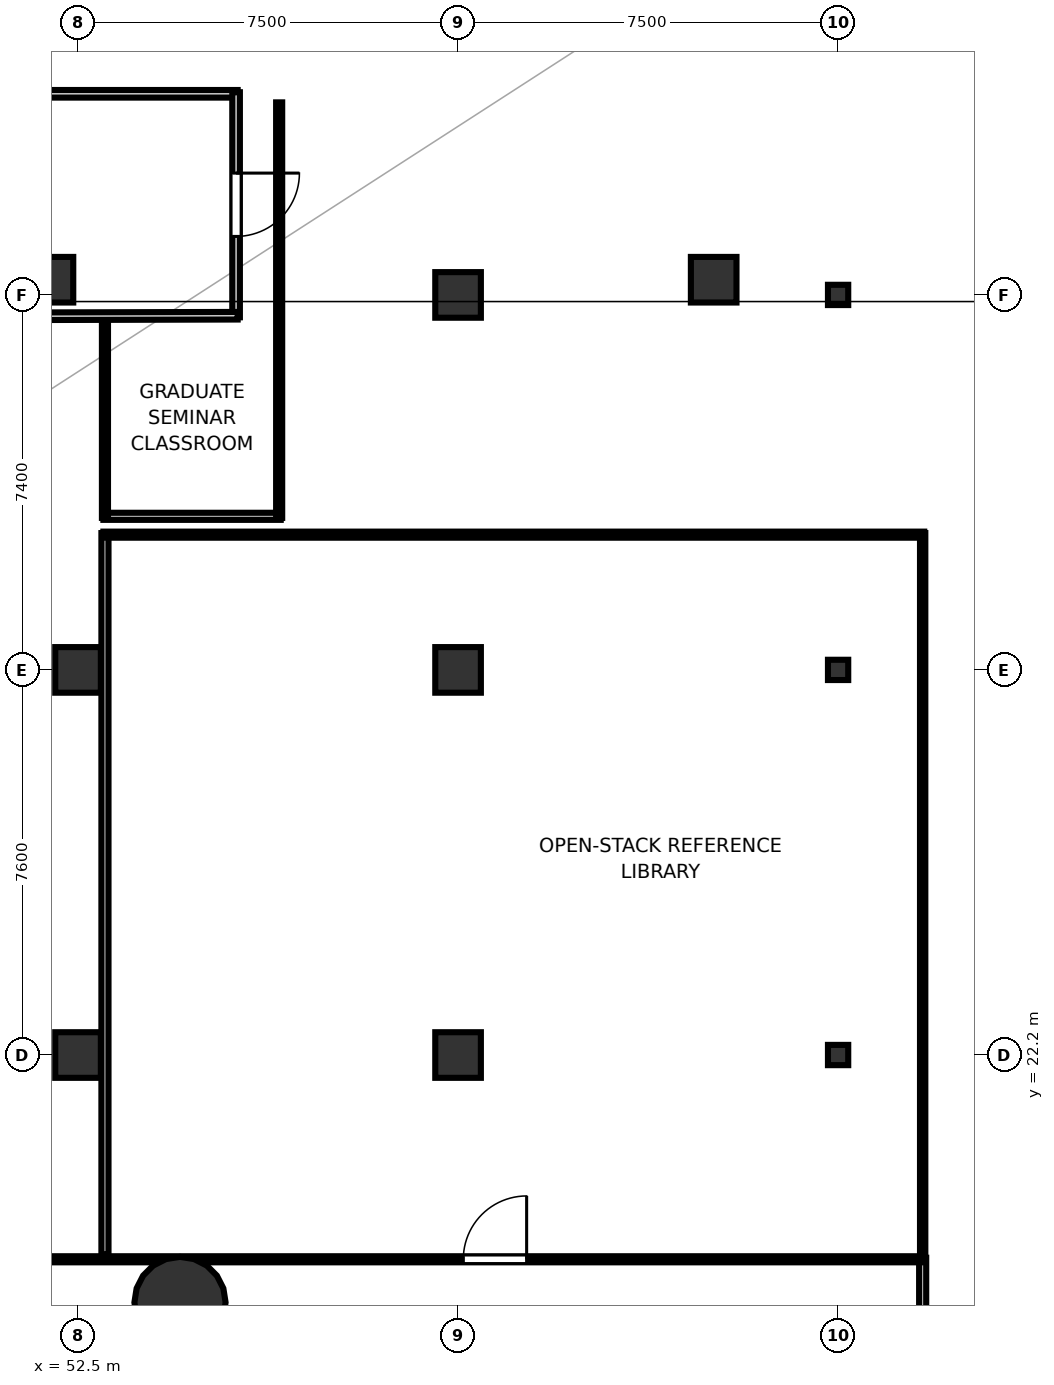
"""IFC4 building model, lengths in metres.
Left out: names, types, materials, properties, quantities, classifications, styles, units other than length and angle.
Written with IfcOpenShell. Run it as: python <this file> out.ifc"""

import sys

from ifc_helpers import new_model, si_unit, direction, frame, frame_2d, origin, origin_2d, place, context, subcontext, project, spatial, rectangle, hollow_circle, i_section, extrude, element, fill, save


model = new_model("IFC4")
c1 = context("Model", 3, precision=1e-05, world=origin(), true_north=direction((0.0, 1.0)))
c2 = subcontext(c1, "Body", "Model", "MODEL_VIEW")
j1 = project(units=[si_unit("LENGTHUNIT", "METRE"), si_unit("PLANEANGLEUNIT", "RADIAN")], contexts=[c1])
p1 = place(None, origin())
s1 = spatial("IfcSite", under=j1, at=p1, CompositionType="ELEMENT")
p2 = place(p1, origin())
s2 = spatial("IfcBuilding", under=s1, at=p2, CompositionType="ELEMENT")
p3 = place(p2, frame((0.0, 0.0, 15.8)))
s3 = spatial("IfcBuildingStorey", under=s2, at=p3, CompositionType="ELEMENT", Elevation=15.8)
p4 = place(p3, frame((54.512, 17.317, 0.0), z_axis=(0.0, 0.0, 1.0), x_axis=(1.0, 0.0, 0.0)))
e1 = element("IfcColumn", 1, at=p4, inside=s3, PredefinedType="COLUMN", context=c2, shape_type="SweptSolid", body=[
    extrude(hollow_circle(Radius=0.9, WallThickness=0.045, at=origin_2d()), origin(), (0.0, 0.0, 1.0), 4.8),
])
for number, where, z_axis, x_axis in (
    (2, (51.955, 37.5, 0.0), (0.0, 0.0, 1.0), (1.0, 0.0, 0.0)),
    (3, (65.045, 37.5, 0.0), (0.0, 0.0, 1.0), (1.0, 0.0, 0.0)),
    (4, (52.5, 22.2, 0.0), (0.0, 0.0, 1.0), (1.0, 0.0, 0.0)),
    (5, (52.5, 29.8, 0.0), (0.0, 0.0, 1.0), (1.0, 0.0, 0.0)),
    (6, (60.0, 22.2, 0.0), (0.0, 0.0, 1.0), (1.0, 0.0, 0.0)),
    (7, (60.0, 29.8, 0.0), (0.0, 0.0, 1.0), (1.0, 0.0, 0.0)),
    (8, (60.0, 37.2, 0.0), (0.0, 0.0, 1.0), (1.0, 0.0, 0.0)),
):
    element("IfcColumn", number, at=place(p3, frame(where, z_axis=z_axis, x_axis=x_axis)), inside=s3, PredefinedType="COLUMN", context=c2, shape_type="SweptSolid", body=[
        extrude(rectangle(XDim=0.9, YDim=0.9, at=origin_2d()), origin(), (0.0, 0.0, 1.0), 4.8),
    ])
for number, where, z_axis, x_axis in (
    (9, (67.5, 22.2, 0.0), (0.0, 0.0, 1.0), (1.0, 0.0, 0.0)),
    (10, (67.5, 29.8, 0.0), (0.0, 0.0, 1.0), (1.0, 0.0, 0.0)),
    (11, (67.5, 37.2, 0.0), (0.0, 0.0, 1.0), (1.0, 0.0, 0.0)),
):
    element("IfcColumn", number, at=place(p3, frame(where, z_axis=z_axis, x_axis=x_axis)), inside=s3, PredefinedType="COLUMN", context=c2, shape_type="SweptSolid", body=[
        extrude(i_section(OverallWidth=0.4, OverallDepth=0.4, WebThickness=0.013, FlangeThickness=0.021, at=origin_2d()), origin(), (0.0, 0.0, 1.0), 4.8),
    ])
p5 = place(p3, frame((46.5, 41.169, 0.0), z_axis=(0.0, 0.0, 1.0), x_axis=(1.0, 0.0, 0.0)))
e12 = element("IfcWall", 12, at=p5, inside=s3, PredefinedType="PARTITIONING", context=c2, shape_type="SweptSolid", body=[
    extrude(rectangle(XDim=9.15, YDim=0.15, at=frame_2d((4.575, 0.0))), origin(), (0.0, 0.0, 1.0), 3.02),
])
p6 = place(p3, frame((55.619, 41.2, 0.0), z_axis=(0.0, 0.0, 1.0), x_axis=(0.0, -1.0, 0.0)))
e13 = element("IfcWall", 13, at=p6, inside=s3, PredefinedType="PARTITIONING", context=c2, shape_type="SweptSolid", body=[
    extrude(rectangle(XDim=4.442, YDim=0.15, at=frame_2d((2.221, 0.0))), origin(), (0.0, 0.0, 1.0), 3.02),
])
p7 = place(p6, frame((1.596, 0.0, 0.0)))
e14 = element("IfcOpeningElement", 14, at=p7, cuts=e13, PredefinedType="OPENING", context=c2, shape_type="SweptSolid", body=[
    extrude(rectangle(XDim=1.25, YDim=2.2, at=frame_2d((0.625, 1.1))), frame((0.0, 0.085, 0.0), z_axis=(0.0, -1.0, 0.0), x_axis=(1.0, 0.0, 0.0)), (0.0, 0.0, 1.0), 0.17),
])
p8 = place(p3, frame((55.65, 36.789, 0.0), z_axis=(0.0, 0.0, 1.0), x_axis=(-0.999996901459, -0.002489391821, 0.0)))
e15 = element("IfcWall", 15, at=p8, inside=s3, PredefinedType="PARTITIONING", context=c2, shape_type="SweptSolid", body=[
    extrude(rectangle(XDim=8.925, YDim=0.15, at=frame_2d((4.462, 0.0))), origin(), (0.0, 0.0, 1.0), 3.02),
])
p9 = place(p3, frame((69.169, 18.2, 0.0), z_axis=(0.0, 0.0, 1.0), x_axis=(0.0, -1.0, 0.0)))
e16 = element("IfcWall", 16, at=p9, inside=s3, PredefinedType="PARTITIONING", context=c2, shape_type="SweptSolid", body=[
    extrude(rectangle(XDim=10.796, YDim=0.14, at=frame_2d((5.398, 0.0))), origin(), (0.0, 0.0, 1.0), 3.02),
])
p10 = place(p3, frame((42.3, 18.169, 0.0), z_axis=(0.0, 0.0, 1.0), x_axis=(1.0, 0.0, 0.0)))
e17 = element("IfcWall", 17, at=p10, inside=s3, PredefinedType="PARTITIONING", context=c2, shape_type="SweptSolid", body=[
    extrude(rectangle(XDim=26.9, YDim=0.12, at=frame_2d((13.45, 0.0))), origin(), (0.0, 0.0, 1.0), 3.02),
])
p11 = place(p10, frame((17.803, 0.0, 0.0)))
e18 = element("IfcOpeningElement", 18, at=p11, cuts=e17, PredefinedType="OPENING", context=c2, shape_type="SweptSolid", body=[
    extrude(rectangle(XDim=1.25, YDim=2.2, at=frame_2d((0.625, 1.1))), frame((0.0, 0.07, 0.0), z_axis=(0.0, -1.0, 0.0), x_axis=(1.0, 0.0, 0.0)), (0.0, 0.0, 1.0), 0.14),
])
p12 = place(p3, frame((53.031, 18.262, 0.0), z_axis=(0.0, 0.0, 1.0), x_axis=(0.0, 1.0, 0.0)))
e19 = element("IfcWall", 19, at=p12, inside=s3, PredefinedType="PARTITIONING", context=c2, shape_type="SweptSolid", body=[
    extrude(rectangle(XDim=14.238, YDim=0.14, at=frame_2d((7.119, 0.0))), origin(), (0.0, 0.0, 1.0), 3.02),
])
p13 = place(p3, frame((53.0, 32.469, 0.0), z_axis=(0.0, 0.0, 1.0), x_axis=(1.0, 0.0, 0.0)))
e20 = element("IfcWall", 20, at=p13, inside=s3, PredefinedType="PARTITIONING", context=c2, shape_type="SweptSolid", body=[
    extrude(rectangle(XDim=16.2, YDim=0.12, at=frame_2d((8.1, 0.0))), origin(), (0.0, 0.0, 1.0), 3.02),
])
p14 = place(p3, frame((69.169, 32.5, 0.0), z_axis=(0.0, 0.0, 1.0), x_axis=(0.0, -1.0, 0.0)))
e21 = element("IfcWall", 21, at=p14, inside=s3, PredefinedType="PARTITIONING", context=c2, shape_type="SweptSolid", body=[
    extrude(rectangle(XDim=14.238, YDim=0.105, at=frame_2d((7.119, 0.0))), origin(), (0.0, 0.0, 1.0), 3.02),
])
p15 = place(p3, frame((56.5, 32.831, 0.0), z_axis=(0.0, 0.0, 1.0), x_axis=(-1.0, 0.0, 0.0)))
e22 = element("IfcWall", 22, at=p15, inside=s3, PredefinedType="PARTITIONING", context=c2, shape_type="SweptSolid", body=[
    extrude(rectangle(XDim=3.5, YDim=0.14, at=frame_2d((1.75, 0.0))), origin(), (0.0, 0.0, 1.0), 3.02),
])
p16 = place(p3, frame((53.031, 32.8, 0.0), z_axis=(0.0, 0.0, 1.0), x_axis=(0.0, 1.0, 0.0)))
e23 = element("IfcWall", 23, at=p16, inside=s3, PredefinedType="PARTITIONING", context=c2, shape_type="SweptSolid", body=[
    extrude(rectangle(XDim=3.89, YDim=0.12, at=frame_2d((1.945, 0.0))), origin(), (0.0, 0.0, 1.0), 3.02),
])
p17 = place(p3, frame((56.469, 41.0, 0.0), z_axis=(0.0, 0.0, 1.0), x_axis=(0.0, -1.0, 0.0)))
e24 = element("IfcWall", 24, at=p17, inside=s3, PredefinedType="PARTITIONING", context=c2, shape_type="SweptSolid", body=[
    extrude(rectangle(XDim=8.2, YDim=0.12, at=frame_2d((4.1, 0.0))), origin(), (0.0, 0.0, 1.0), 3.02),
])
p18 = place(p7, origin())
e25 = element("IfcDoor", 25, at=p18, inside=s3, OperationType="SINGLE_SWING_LEFT", PredefinedType="DOOR", context=c2, shape_type="SweptSolid", body=[
    extrude(rectangle(XDim=1.25, YDim=2.2, at=frame_2d((0.625, 1.1))), frame((0.0, 0.025, 0.0), z_axis=(0.0, -1.0, 0.0), x_axis=(1.0, 0.0, 0.0)), (0.0, 0.0, 1.0), 0.05),
])
fill(e14, e25)
p19 = place(p11, origin())
e26 = element("IfcDoor", 26, at=p19, inside=s3, OperationType="SINGLE_SWING_RIGHT", PredefinedType="DOOR", context=c2, shape_type="SweptSolid", body=[
    extrude(rectangle(XDim=1.25, YDim=2.2, at=frame_2d((0.625, 1.1))), frame((0.0, 0.025, 0.0), z_axis=(0.0, -1.0, 0.0), x_axis=(1.0, 0.0, 0.0)), (0.0, 0.0, 1.0), 0.05),
])
fill(e18, e26)
save(model, sys.argv[1])
